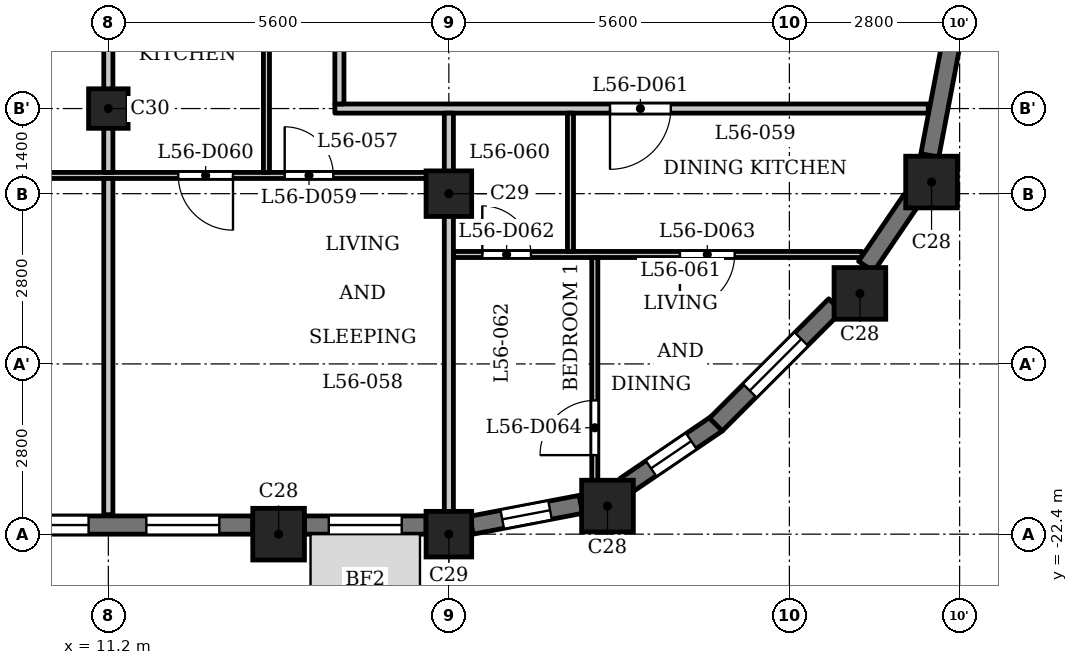
"""IFC4 building model, lengths in metres.
Left out: names, types, materials, properties, quantities, classifications, styles, units other than length and angle.
Written with IfcOpenShell. Run it as: python <this file> out.ifc"""

import sys

from ifc_helpers import new_model, si_unit, direction, frame, frame_2d, origin, origin_2d, place, context, subcontext, project, spatial, rectangle, extrude, element, fill, save


model = new_model("IFC4")
c1 = context("Model", 3, precision=1e-05, world=origin(), true_north=direction((0.0, 1.0)))
c2 = subcontext(c1, "Body", "Model", "MODEL_VIEW")
j1 = project(units=[si_unit("LENGTHUNIT", "METRE"), si_unit("PLANEANGLEUNIT", "RADIAN")], contexts=[c1])
p1 = place(None, origin())
s1 = spatial("IfcSite", under=j1, at=p1, CompositionType="ELEMENT")
p2 = place(p1, origin())
s2 = spatial("IfcBuilding", under=s1, at=p2, CompositionType="ELEMENT")
p3 = place(p2, frame((0.0, 0.0, 216.9)))
s3 = spatial("IfcBuildingStorey", under=s2, at=p3, CompositionType="ELEMENT", Elevation=216.9)
for number, where, z_axis, x_axis in (
    (1, (14.0, -22.4, 0.0), (0.0, 0.0, 1.0), (1.0, 0.0, 0.0)),
    (2, (19.409, -21.938, 0.0), (0.0, 0.0, 1.0), (1.0, 0.0, 0.0)),
    (3, (23.56, -18.44, 0.0), (0.0, 0.0, 1.0), (1.0, 0.0, 0.0)),
    (4, (24.738, -16.609, 0.0), (0.0, 0.0, 1.0), (1.0, 0.0, 0.0)),
):
    element("IfcColumn", number, at=place(p3, frame(where, z_axis=z_axis, x_axis=x_axis)), inside=s3, PredefinedType="COLUMN", context=c2, shape_type="SweptSolid", body=[
        extrude(rectangle(XDim=0.85, YDim=0.85, at=origin_2d()), origin(), (0.0, 0.0, 1.0), 3.5),
    ])
for number, where, z_axis, x_axis in (
    (5, (16.8, -22.4, 0.0), (0.0, 0.0, 1.0), (1.0, 0.0, 0.0)),
    (6, (16.8, -16.8, 0.0), (0.0, 0.0, 1.0), (1.0, 0.0, 0.0)),
):
    element("IfcColumn", number, at=place(p3, frame(where, z_axis=z_axis, x_axis=x_axis)), inside=s3, PredefinedType="COLUMN", context=c2, shape_type="SweptSolid", body=[
        extrude(rectangle(XDim=0.75, YDim=0.75, at=origin_2d()), origin(), (0.0, 0.0, 1.0), 3.5),
    ])
p4 = place(p3, frame((11.2, -15.4, 0.0), z_axis=(0.0, 0.0, 1.0), x_axis=(1.0, 0.0, 0.0)))
e7 = element("IfcColumn", 7, at=p4, inside=s3, PredefinedType="COLUMN", context=c2, shape_type="SweptSolid", body=[
    extrude(rectangle(XDim=0.65, YDim=0.65, at=origin_2d()), origin(), (0.0, 0.0, 1.0), 3.5),
])
p5 = place(p3, frame((8.825, -22.25, 0.0), z_axis=(0.0, 0.0, 1.0), x_axis=(1.0, 0.0, 0.0)))
e8 = element("IfcWall", 8, at=p5, inside=s3, PredefinedType="SOLIDWALL", context=c2, shape_type="SweptSolid", body=[
    extrude(rectangle(XDim=4.75, YDim=0.3, at=frame_2d((2.375, 0.0))), origin(), (0.0, 0.0, 1.0), 2.5),
])
p6 = place(p5, frame((0.25, 0.0, 0.9)))
e9 = element("IfcOpeningElement", 9, at=p6, cuts=e8, PredefinedType="OPENING", context=c2, shape_type="SweptSolid", body=[
    extrude(rectangle(XDim=1.8, YDim=1.25, at=frame_2d((0.9, 0.625))), frame((0.0, 0.16, 0.0), z_axis=(0.0, -1.0, 0.0), x_axis=(1.0, 0.0, 0.0)), (0.0, 0.0, 1.0), 0.32),
])
p7 = place(p5, frame((3.0, 0.0, 0.6)))
e10 = element("IfcOpeningElement", 10, at=p7, cuts=e8, PredefinedType="OPENING", context=c2, shape_type="SweptSolid", body=[
    extrude(rectangle(XDim=1.2, YDim=1.55, at=frame_2d((0.6, 0.775))), frame((0.0, 0.16, 0.0), z_axis=(0.0, -1.0, 0.0), x_axis=(1.0, 0.0, 0.0)), (0.0, 0.0, 1.0), 0.32),
])
p8 = place(p3, frame((14.425, -22.25, 0.0), z_axis=(0.0, 0.0, 1.0), x_axis=(1.0, 0.0, 0.0)))
e11 = element("IfcWall", 11, at=p8, inside=s3, PredefinedType="SOLIDWALL", context=c2, shape_type="SweptSolid", body=[
    extrude(rectangle(XDim=2.0, YDim=0.3, at=frame_2d((1.0, 0.0))), origin(), (0.0, 0.0, 1.0), 2.5),
])
p9 = place(p8, frame((0.4, 0.0, 0.6)))
e12 = element("IfcOpeningElement", 12, at=p9, cuts=e11, PredefinedType="OPENING", context=c2, shape_type="SweptSolid", body=[
    extrude(rectangle(XDim=1.2, YDim=1.55, at=frame_2d((0.6, 0.775))), frame((0.0, 0.16, 0.0), z_axis=(0.0, -1.0, 0.0), x_axis=(1.0, 0.0, 0.0)), (0.0, 0.0, 1.0), 0.32),
])
p10 = place(p3, frame((17.172, -22.253, 0.0), z_axis=(0.0, 0.0, 1.0), x_axis=(0.982300037503, 0.187314271538, 0.0)))
e13 = element("IfcWall", 13, at=p10, inside=s3, PredefinedType="SOLIDWALL", context=c2, shape_type="SweptSolid", body=[
    extrude(rectangle(XDim=1.831, YDim=0.3, at=frame_2d((0.916, 0.0))), origin(), (0.0, 0.0, 1.0), 2.5),
])
p11 = place(p10, frame((0.516, 0.0, 0.6)))
e14 = element("IfcOpeningElement", 14, at=p11, cuts=e13, PredefinedType="OPENING", context=c2, shape_type="SweptSolid", body=[
    extrude(rectangle(XDim=0.8, YDim=1.55, at=frame_2d((0.4, 0.775))), frame((0.0, 0.16, 0.0), z_axis=(0.0, -1.0, 0.0), x_axis=(1.0, 0.0, 0.0)), (0.0, 0.0, 1.0), 0.32),
])
p12 = place(p3, frame((19.698, -21.608, 0.0), z_axis=(0.0, 0.0, 1.0), x_axis=(0.82705295608, 0.562124014644, 0.0)))
e15 = element("IfcWall", 15, at=p12, inside=s3, PredefinedType="SOLIDWALL", context=c2, shape_type="SweptSolid", body=[
    extrude(rectangle(XDim=1.831, YDim=0.3, at=frame_2d((0.916, 0.0))), origin(), (0.0, 0.0, 1.0), 2.5),
])
p13 = place(p12, frame((0.516, 0.0, 0.6)))
e16 = element("IfcOpeningElement", 16, at=p13, cuts=e15, PredefinedType="OPENING", context=c2, shape_type="SweptSolid", body=[
    extrude(rectangle(XDim=0.8, YDim=1.55, at=frame_2d((0.4, 0.775))), frame((0.0, 0.16, 0.0), z_axis=(0.0, -1.0, 0.0), x_axis=(1.0, 0.0, 0.0)), (0.0, 0.0, 1.0), 0.32),
])
p14 = place(p3, frame((21.191, -20.597, 0.0), z_axis=(0.0, 0.0, 1.0), x_axis=(0.707150767798, 0.707062791838, 0.0)))
e17 = element("IfcWall", 17, at=p14, inside=s3, PredefinedType="SOLIDWALL", context=c2, shape_type="SweptSolid", body=[
    extrude(rectangle(XDim=2.775, YDim=0.3, at=frame_2d((1.388, 0.0))), origin(), (0.0, 0.0, 1.0), 2.5),
])
p15 = place(p14, frame((0.788, 0.0, 0.6)))
e18 = element("IfcOpeningElement", 18, at=p15, cuts=e17, PredefinedType="OPENING", context=c2, shape_type="SweptSolid", body=[
    extrude(rectangle(XDim=1.2, YDim=1.55, at=frame_2d((0.6, 0.775))), frame((0.0, 0.16, 0.0), z_axis=(0.0, -1.0, 0.0), x_axis=(1.0, 0.0, 0.0)), (0.0, 0.0, 1.0), 0.32),
])
p16 = place(p3, frame((23.662, -17.996, 0.0), z_axis=(0.0, 0.0, 1.0), x_axis=(0.562149004813, 0.827035970432, 0.0)))
e19 = element("IfcWall", 19, at=p16, inside=s3, PredefinedType="SOLIDWALL", context=c2, shape_type="SweptSolid", body=[
    extrude(rectangle(XDim=1.327, YDim=0.3, at=frame_2d((0.664, 0.0))), origin(), (0.0, 0.0, 1.0), 2.5),
])
p17 = place(p3, frame((24.709, -16.171, 0.0), z_axis=(0.0, 0.0, 1.0), x_axis=(0.187442908742, 0.982275499014, 0.0)))
e20 = element("IfcWall", 20, at=p17, inside=s3, PredefinedType="SOLIDWALL", context=c2, shape_type="SweptSolid", body=[
    extrude(rectangle(XDim=1.831, YDim=0.3, at=frame_2d((0.916, 0.0))), origin(), (0.0, 0.0, 1.0), 2.5),
])
p18 = place(p3, frame((16.875, -17.8, 0.0), z_axis=(0.0, 0.0, 1.0), x_axis=(1.0, 0.0, 0.0)))
e21 = element("IfcWall", 21, at=p18, inside=s3, PredefinedType="PARTITIONING", context=c2, shape_type="SweptSolid", body=[
    extrude(rectangle(XDim=6.719, YDim=0.1, at=frame_2d((3.359, 0.0))), origin(), (0.0, 0.0, 1.0), 3.2),
])
p19 = place(p18, frame((0.475, 0.0, 0.0)))
e22 = element("IfcOpeningElement", 22, at=p19, cuts=e21, PredefinedType="OPENING", context=c2, shape_type="SweptSolid", body=[
    extrude(rectangle(XDim=0.8, YDim=2.1, at=frame_2d((0.4, 1.05))), frame((0.0, 0.06, 0.0), z_axis=(0.0, -1.0, 0.0), x_axis=(1.0, 0.0, 0.0)), (0.0, 0.0, 1.0), 0.12),
])
p20 = place(p18, frame((3.725, 0.0, 0.0)))
e23 = element("IfcOpeningElement", 23, at=p20, cuts=e21, PredefinedType="OPENING", context=c2, shape_type="SweptSolid", body=[
    extrude(rectangle(XDim=0.9, YDim=2.1, at=frame_2d((0.45, 1.05))), frame((0.0, 0.06, 0.0), z_axis=(0.0, -1.0, 0.0), x_axis=(1.0, 0.0, 0.0)), (0.0, 0.0, 1.0), 0.12),
])
p21 = place(p3, frame((-16.725, -16.5, 0.0), z_axis=(0.0, 0.0, 1.0), x_axis=(1.0, 0.0, 0.0)))
e24 = element("IfcWall", 24, at=p21, inside=s3, PredefinedType="PARTITIONING", context=c2, shape_type="SweptSolid", body=[
    extrude(rectangle(XDim=33.45, YDim=0.1, at=frame_2d((16.725, 0.0))), origin(), (0.0, 0.0, 1.0), 3.2),
])
p22 = place(p21, frame((0.675, 0.0, 0.0)))
e25 = element("IfcOpeningElement", 25, at=p22, cuts=e24, PredefinedType="OPENING", context=c2, shape_type="SweptSolid", body=[
    extrude(rectangle(XDim=0.8, YDim=2.1, at=frame_2d((0.4, 1.05))), frame((0.0, 0.06, 0.0), z_axis=(0.0, -1.0, 0.0), x_axis=(1.0, 0.0, 0.0)), (0.0, 0.0, 1.0), 0.12),
])
p23 = place(p21, frame((2.775, 0.0, 0.0)))
e26 = element("IfcOpeningElement", 26, at=p23, cuts=e24, PredefinedType="OPENING", context=c2, shape_type="SweptSolid", body=[
    extrude(rectangle(XDim=0.9, YDim=2.1, at=frame_2d((0.45, 1.05))), frame((0.0, 0.06, 0.0), z_axis=(0.0, -1.0, 0.0), x_axis=(1.0, 0.0, 0.0)), (0.0, 0.0, 1.0), 0.12),
])
p24 = place(p21, frame((6.425, 0.0, 0.0)))
e27 = element("IfcOpeningElement", 27, at=p24, cuts=e24, PredefinedType="OPENING", context=c2, shape_type="SweptSolid", body=[
    extrude(rectangle(XDim=0.8, YDim=2.1, at=frame_2d((0.4, 1.05))), frame((0.0, 0.06, 0.0), z_axis=(0.0, -1.0, 0.0), x_axis=(1.0, 0.0, 0.0)), (0.0, 0.0, 1.0), 0.12),
])
p25 = place(p21, frame((8.775, 0.0, 0.0)))
e28 = element("IfcOpeningElement", 28, at=p25, cuts=e24, PredefinedType="OPENING", context=c2, shape_type="SweptSolid", body=[
    extrude(rectangle(XDim=0.9, YDim=2.1, at=frame_2d((0.45, 1.05))), frame((0.0, 0.06, 0.0), z_axis=(0.0, -1.0, 0.0), x_axis=(1.0, 0.0, 0.0)), (0.0, 0.0, 1.0), 0.12),
])
p26 = place(p21, frame((12.525, 0.0, 0.0)))
e29 = element("IfcOpeningElement", 29, at=p26, cuts=e24, PredefinedType="OPENING", context=c2, shape_type="SweptSolid", body=[
    extrude(rectangle(XDim=0.9, YDim=2.1, at=frame_2d((0.45, 1.05))), frame((0.0, 0.06, 0.0), z_axis=(0.0, -1.0, 0.0), x_axis=(1.0, 0.0, 0.0)), (0.0, 0.0, 1.0), 0.12),
])
p27 = place(p21, frame((14.775, 0.0, 0.0)))
e30 = element("IfcOpeningElement", 30, at=p27, cuts=e24, PredefinedType="OPENING", context=c2, shape_type="SweptSolid", body=[
    extrude(rectangle(XDim=0.9, YDim=2.1, at=frame_2d((0.45, 1.05))), frame((0.0, 0.06, 0.0), z_axis=(0.0, -1.0, 0.0), x_axis=(1.0, 0.0, 0.0)), (0.0, 0.0, 1.0), 0.12),
])
p28 = place(p21, frame((25.475, 0.0, 0.0)))
e31 = element("IfcOpeningElement", 31, at=p28, cuts=e24, PredefinedType="OPENING", context=c2, shape_type="SweptSolid", body=[
    extrude(rectangle(XDim=0.8, YDim=2.1, at=frame_2d((0.4, 1.05))), frame((0.0, 0.06, 0.0), z_axis=(0.0, -1.0, 0.0), x_axis=(1.0, 0.0, 0.0)), (0.0, 0.0, 1.0), 0.12),
])
p29 = place(p21, frame((23.225, 0.0, 0.0)))
e32 = element("IfcOpeningElement", 32, at=p29, cuts=e24, PredefinedType="OPENING", context=c2, shape_type="SweptSolid", body=[
    extrude(rectangle(XDim=0.9, YDim=2.1, at=frame_2d((0.45, 1.05))), frame((0.0, 0.06, 0.0), z_axis=(0.0, -1.0, 0.0), x_axis=(1.0, 0.0, 0.0)), (0.0, 0.0, 1.0), 0.12),
])
p30 = place(p21, frame((17.875, 0.0, 0.0)))
e33 = element("IfcOpeningElement", 33, at=p30, cuts=e24, PredefinedType="OPENING", context=c2, shape_type="SweptSolid", body=[
    extrude(rectangle(XDim=0.9, YDim=2.1, at=frame_2d((0.45, 1.05))), frame((0.0, 0.06, 0.0), z_axis=(0.0, -1.0, 0.0), x_axis=(1.0, 0.0, 0.0)), (0.0, 0.0, 1.0), 0.12),
])
p31 = place(p21, frame((19.975, 0.0, 0.0)))
e34 = element("IfcOpeningElement", 34, at=p31, cuts=e24, PredefinedType="OPENING", context=c2, shape_type="SweptSolid", body=[
    extrude(rectangle(XDim=0.9, YDim=2.1, at=frame_2d((0.45, 1.05))), frame((0.0, 0.06, 0.0), z_axis=(0.0, -1.0, 0.0), x_axis=(1.0, 0.0, 0.0)), (0.0, 0.0, 1.0), 0.12),
])
p32 = place(p21, frame((30.825, 0.0, 0.0)))
e35 = element("IfcOpeningElement", 35, at=p32, cuts=e24, PredefinedType="OPENING", context=c2, shape_type="SweptSolid", body=[
    extrude(rectangle(XDim=0.8, YDim=2.1, at=frame_2d((0.4, 1.05))), frame((0.0, 0.06, 0.0), z_axis=(0.0, -1.0, 0.0), x_axis=(1.0, 0.0, 0.0)), (0.0, 0.0, 1.0), 0.12),
])
p33 = place(p21, frame((29.075, 0.0, 0.0)))
e36 = element("IfcOpeningElement", 36, at=p33, cuts=e24, PredefinedType="OPENING", context=c2, shape_type="SweptSolid", body=[
    extrude(rectangle(XDim=0.9, YDim=2.1, at=frame_2d((0.45, 1.05))), frame((0.0, 0.06, 0.0), z_axis=(0.0, -1.0, 0.0), x_axis=(1.0, 0.0, 0.0)), (0.0, 0.0, 1.0), 0.12),
])
p34 = place(p3, frame((14.925, -15.4, 0.0), z_axis=(0.0, 0.0, 1.0), x_axis=(1.0, 0.0, 0.0)))
e37 = element("IfcWall", 37, at=p34, inside=s3, PredefinedType="PARTITIONING", context=c2, shape_type="SweptSolid", body=[
    extrude(rectangle(XDim=9.759, YDim=0.15, at=frame_2d((4.879, 0.0))), origin(), (0.0, 0.0, 1.0), 3.2),
])
p35 = place(p34, frame((4.525, 0.0, 0.0)))
e38 = element("IfcOpeningElement", 38, at=p35, cuts=e37, PredefinedType="OPENING", context=c2, shape_type="SweptSolid", body=[
    extrude(rectangle(XDim=1.0, YDim=2.1, at=frame_2d((0.5, 1.05))), frame((0.0, 0.085, 0.0), z_axis=(0.0, -1.0, 0.0), x_axis=(1.0, 0.0, 0.0)), (0.0, 0.0, 1.0), 0.17),
])
p36 = place(p3, frame((11.2, -22.08, 0.0), z_axis=(0.0, 0.0, 1.0), x_axis=(0.0, 1.0, 0.0)))
e39 = element("IfcWall", 39, at=p36, inside=s3, PredefinedType="PARTITIONING", context=c2, shape_type="SweptSolid", body=[
    extrude(rectangle(XDim=5.53, YDim=0.15, at=frame_2d((2.765, 0.0))), origin(), (0.0, 0.0, 1.0), 3.2),
])
p37 = place(p3, frame((11.2, -16.45, 0.0), z_axis=(0.0, 0.0, 1.0), x_axis=(0.0, 1.0, 0.0)))
e40 = element("IfcWall", 40, at=p37, inside=s3, PredefinedType="PARTITIONING", context=c2, shape_type="SweptSolid", body=[
    extrude(rectangle(XDim=3.175, YDim=0.15, at=frame_2d((1.587, 0.0))), origin(), (0.0, 0.0, 1.0), 3.2),
])
p38 = place(p3, frame((13.8, -16.45, 0.0), z_axis=(0.0, 0.0, 1.0), x_axis=(0.0, 1.0, 0.0)))
e41 = element("IfcWall", 41, at=p38, inside=s3, PredefinedType="PARTITIONING", context=c2, shape_type="SweptSolid", body=[
    extrude(rectangle(XDim=3.175, YDim=0.1, at=frame_2d((1.587, 0.0))), origin(), (0.0, 0.0, 1.0), 3.2),
])
p39 = place(p3, frame((15.0, -15.325, 0.0), z_axis=(0.0, 0.0, 1.0), x_axis=(0.0, 1.0, 0.0)))
e42 = element("IfcWall", 42, at=p39, inside=s3, PredefinedType="PARTITIONING", context=c2, shape_type="SweptSolid", body=[
    extrude(rectangle(XDim=2.05, YDim=0.15, at=frame_2d((1.025, 0.0))), origin(), (0.0, 0.0, 1.0), 3.2),
])
p40 = place(p3, frame((16.8, -22.31, 0.0), z_axis=(0.0, 0.0, 1.0), x_axis=(0.0, 1.0, 0.0)))
e43 = element("IfcWall", 43, at=p40, inside=s3, PredefinedType="PARTITIONING", context=c2, shape_type="SweptSolid", body=[
    extrude(rectangle(XDim=6.835, YDim=0.15, at=frame_2d((3.417, 0.0))), origin(), (0.0, 0.0, 1.0), 2.55),
])
p41 = place(p3, frame((18.8, -17.75, 0.0), z_axis=(0.0, 0.0, 1.0), x_axis=(0.0, 1.0, 0.0)))
e44 = element("IfcWall", 44, at=p41, inside=s3, PredefinedType="PARTITIONING", context=c2, shape_type="SweptSolid", body=[
    extrude(rectangle(XDim=2.275, YDim=0.1, at=frame_2d((1.137, 0.0))), origin(), (0.0, 0.0, 1.0), 3.2),
])
p42 = place(p3, frame((19.2, -21.92, 0.0), z_axis=(0.0, 0.0, 1.0), x_axis=(0.0, 1.0, 0.0)))
e45 = element("IfcWall", 45, at=p42, inside=s3, PredefinedType="PARTITIONING", context=c2, shape_type="SweptSolid", body=[
    extrude(rectangle(XDim=4.07, YDim=0.1, at=frame_2d((2.035, 0.0))), origin(), (0.0, 0.0, 1.0), 3.2),
])
p43 = place(p42, frame((0.82, 0.0, 0.0)))
e46 = element("IfcOpeningElement", 46, at=p43, cuts=e45, PredefinedType="OPENING", context=c2, shape_type="SweptSolid", body=[
    extrude(rectangle(XDim=0.9, YDim=2.1, at=frame_2d((0.45, 1.05))), frame((0.0, 0.06, 0.0), z_axis=(0.0, -1.0, 0.0), x_axis=(1.0, 0.0, 0.0)), (0.0, 0.0, 1.0), 0.12),
])
p44 = place(p32, origin())
e47 = element("IfcDoor", 47, at=p44, inside=s3, OperationType="SINGLE_SWING_RIGHT", PredefinedType="DOOR", context=c2, shape_type="SweptSolid", body=[
    extrude(rectangle(XDim=0.8, YDim=2.1, at=frame_2d((0.4, 1.05))), frame((0.0, 0.025, 0.0), z_axis=(0.0, -1.0, 0.0), x_axis=(1.0, 0.0, 0.0)), (0.0, 0.0, 1.0), 0.05),
])
fill(e35, e47)
p45 = place(p33, origin())
e48 = element("IfcDoor", 48, at=p45, inside=s3, OperationType="SINGLE_SWING_RIGHT", PredefinedType="DOOR", context=c2, shape_type="SweptSolid", body=[
    extrude(rectangle(XDim=0.9, YDim=2.1, at=frame_2d((0.45, 1.05))), frame((0.0, 0.025, 0.0), z_axis=(0.0, -1.0, 0.0), x_axis=(1.0, 0.0, 0.0)), (0.0, 0.0, 1.0), 0.05),
])
fill(e36, e48)
p46 = place(p35, origin())
e49 = element("IfcDoor", 49, at=p46, inside=s3, OperationType="SINGLE_SWING_LEFT", PredefinedType="DOOR", context=c2, shape_type="SweptSolid", body=[
    extrude(rectangle(XDim=1.0, YDim=2.1, at=frame_2d((0.5, 1.05))), frame((0.0, 0.025, 0.0), z_axis=(0.0, -1.0, 0.0), x_axis=(1.0, 0.0, 0.0)), (0.0, 0.0, 1.0), 0.05),
])
fill(e38, e49)
p47 = place(p19, origin())
e50 = element("IfcDoor", 50, at=p47, inside=s3, OperationType="SINGLE_SWING_RIGHT", PredefinedType="DOOR", context=c2, shape_type="SweptSolid", body=[
    extrude(rectangle(XDim=0.8, YDim=2.1, at=frame_2d((0.4, 1.05))), frame((0.0, 0.025, 0.0), z_axis=(0.0, -1.0, 0.0), x_axis=(1.0, 0.0, 0.0)), (0.0, 0.0, 1.0), 0.05),
])
fill(e22, e50)
p48 = place(p20, origin())
e51 = element("IfcDoor", 51, at=p48, inside=s3, OperationType="SINGLE_SWING_LEFT", PredefinedType="DOOR", context=c2, shape_type="SweptSolid", body=[
    extrude(rectangle(XDim=0.9, YDim=2.1, at=frame_2d((0.45, 1.05))), frame((0.0, 0.025, 0.0), z_axis=(0.0, -1.0, 0.0), x_axis=(1.0, 0.0, 0.0)), (0.0, 0.0, 1.0), 0.05),
])
fill(e23, e51)
p49 = place(p43, origin())
e52 = element("IfcDoor", 52, at=p49, inside=s3, OperationType="SINGLE_SWING_RIGHT", PredefinedType="DOOR", context=c2, shape_type="SweptSolid", body=[
    extrude(rectangle(XDim=0.9, YDim=2.1, at=frame_2d((0.45, 1.05))), frame((0.0, 0.025, 0.0), z_axis=(0.0, -1.0, 0.0), x_axis=(1.0, 0.0, 0.0)), (0.0, 0.0, 1.0), 0.05),
])
fill(e46, e52)
p50 = place(p6, origin())
e53 = element("IfcWindow", 53, at=p50, inside=s3, PartitioningType="SINGLE_PANEL", PredefinedType="WINDOW", context=c2, shape_type="SweptSolid", body=[
    extrude(rectangle(XDim=1.8, YDim=1.25, at=frame_2d((0.9, 0.625))), frame((0.0, 0.03, 0.0), z_axis=(0.0, -1.0, 0.0), x_axis=(1.0, 0.0, 0.0)), (0.0, 0.0, 1.0), 0.06),
])
fill(e9, e53)
p51 = place(p7, origin())
e54 = element("IfcWindow", 54, at=p51, inside=s3, PartitioningType="SINGLE_PANEL", PredefinedType="WINDOW", context=c2, shape_type="SweptSolid", body=[
    extrude(rectangle(XDim=1.2, YDim=1.55, at=frame_2d((0.6, 0.775))), frame((0.0, 0.03, 0.0), z_axis=(0.0, -1.0, 0.0), x_axis=(1.0, 0.0, 0.0)), (0.0, 0.0, 1.0), 0.06),
])
fill(e10, e54)
p52 = place(p9, origin())
e55 = element("IfcWindow", 55, at=p52, inside=s3, PartitioningType="SINGLE_PANEL", PredefinedType="WINDOW", context=c2, shape_type="SweptSolid", body=[
    extrude(rectangle(XDim=1.2, YDim=1.55, at=frame_2d((0.6, 0.775))), frame((0.0, 0.03, 0.0), z_axis=(0.0, -1.0, 0.0), x_axis=(1.0, 0.0, 0.0)), (0.0, 0.0, 1.0), 0.06),
])
fill(e12, e55)
p53 = place(p11, origin())
e56 = element("IfcWindow", 56, at=p53, inside=s3, PartitioningType="SINGLE_PANEL", PredefinedType="WINDOW", context=c2, shape_type="SweptSolid", body=[
    extrude(rectangle(XDim=0.8, YDim=1.55, at=frame_2d((0.4, 0.775))), frame((0.0, 0.03, 0.0), z_axis=(0.0, -1.0, 0.0), x_axis=(1.0, 0.0, 0.0)), (0.0, 0.0, 1.0), 0.06),
])
fill(e14, e56)
p54 = place(p13, origin())
e57 = element("IfcWindow", 57, at=p54, inside=s3, PartitioningType="SINGLE_PANEL", PredefinedType="WINDOW", context=c2, shape_type="SweptSolid", body=[
    extrude(rectangle(XDim=0.8, YDim=1.55, at=frame_2d((0.4, 0.775))), frame((0.0, 0.03, 0.0), z_axis=(0.0, -1.0, 0.0), x_axis=(1.0, 0.0, 0.0)), (0.0, 0.0, 1.0), 0.06),
])
fill(e16, e57)
p55 = place(p15, origin())
e58 = element("IfcWindow", 58, at=p55, inside=s3, PartitioningType="SINGLE_PANEL", PredefinedType="WINDOW", context=c2, shape_type="SweptSolid", body=[
    extrude(rectangle(XDim=1.2, YDim=1.55, at=frame_2d((0.6, 0.775))), frame((0.0, 0.03, 0.0), z_axis=(0.0, -1.0, 0.0), x_axis=(1.0, 0.0, 0.0)), (0.0, 0.0, 1.0), 0.06),
])
fill(e18, e58)
save(model, sys.argv[1])
